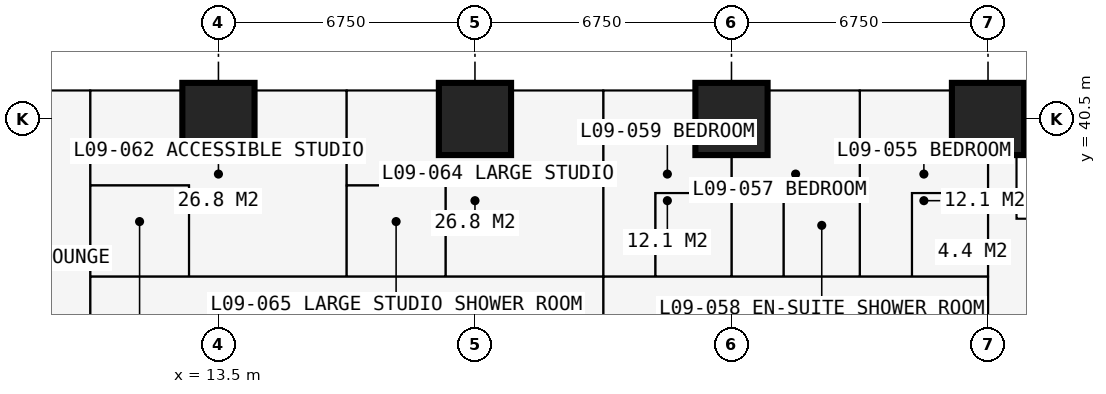
"""IFC4 building model, lengths in metres.
Left out: names, types, materials, properties, quantities, classifications, styles, units other than length and angle.
Written with IfcOpenShell. Run it as: python <this file> out.ifc"""

import sys

from ifc_helpers import new_model, si_unit, direction, frame, frame_2d, origin, origin_2d, place, context, subcontext, project, spatial, rectangle, extrude, element, fill, save


model = new_model("IFC4")
c1 = context("Model", 3, precision=1e-05, world=origin(), true_north=direction((0.0, 1.0)))
c2 = subcontext(c1, "Body", "Model", "MODEL_VIEW")
j1 = project(units=[si_unit("LENGTHUNIT", "METRE"), si_unit("PLANEANGLEUNIT", "RADIAN")], contexts=[c1])
p1 = place(None, origin())
s1 = spatial("IfcSite", under=j1, at=p1, CompositionType="ELEMENT")
p2 = place(p1, origin())
s2 = spatial("IfcBuilding", under=s1, at=p2, CompositionType="ELEMENT")
p3 = place(p2, frame((0.0, 0.0, 36.0)))
s3 = spatial("IfcBuildingStorey", under=s2, at=p3, CompositionType="ELEMENT", Elevation=36.0)
for number, where, z_axis, x_axis in (
    (1, (13.5, 40.5, 0.0), (0.0, 0.0, 1.0), (1.0, 0.0, 0.0)),
    (2, (20.25, 40.5, 0.0), (0.0, 0.0, 1.0), (1.0, 0.0, 0.0)),
    (3, (27.0, 40.5, 0.0), (0.0, 0.0, 1.0), (1.0, 0.0, 0.0)),
    (4, (33.75, 40.5, 0.0), (0.0, 0.0, 1.0), (1.0, 0.0, 0.0)),
):
    element("IfcColumn", number, at=place(p3, frame(where, z_axis=z_axis, x_axis=x_axis)), inside=s3, PredefinedType="COLUMN", context=c2, shape_type="SweptSolid", body=[
        extrude(rectangle(XDim=1.9, YDim=1.9, at=origin_2d()), origin(), (0.0, 0.0, 1.0), 3.6),
    ])
p4 = place(p3, frame((37.875, 37.875, 0.0), z_axis=(0.0, 0.0, 1.0), x_axis=(-1.0, 0.0, 0.0)))
e5 = element("IfcWall", 5, at=p4, inside=s3, PredefinedType="SOLIDWALL", context=c2, shape_type="SweptSolid", body=[
    extrude(rectangle(XDim=3.375, YDim=0.3, at=frame_2d((1.688, 0.0))), origin(), (0.0, 0.0, 1.0), 3.375),
])
p5 = place(p4, frame((0.788, 0.0, 0.6)))
e6 = element("IfcOpeningElement", 6, at=p5, cuts=e5, PredefinedType="OPENING", context=c2, shape_type="SweptSolid", body=[
    extrude(rectangle(XDim=1.8, YDim=2.1, at=frame_2d((0.9, 1.05))), frame((0.0, 0.16, 0.0), z_axis=(0.0, -1.0, 0.0), x_axis=(1.0, 0.0, 0.0)), (0.0, 0.0, 1.0), 0.32),
])
p6 = place(p3, frame((34.5, 37.875, 0.0), z_axis=(0.0, 0.0, 1.0), x_axis=(0.0, 1.0, 0.0)))
e7 = element("IfcWall", 7, at=p6, inside=s3, PredefinedType="SOLIDWALL", context=c2, shape_type="SweptSolid", body=[
    extrude(rectangle(XDim=3.375, YDim=0.3, at=frame_2d((1.688, 0.0))), origin(), (0.0, 0.0, 1.0), 3.375),
])
p7 = place(p6, frame((0.317, 0.0, 0.9)))
e8 = element("IfcOpeningElement", 8, at=p7, cuts=e7, PredefinedType="OPENING", context=c2, shape_type="SweptSolid", body=[
    extrude(rectangle(XDim=1.2, YDim=1.8, at=frame_2d((0.6, 0.9))), frame((0.0, 0.16, 0.0), z_axis=(0.0, -1.0, 0.0), x_axis=(1.0, 0.0, 0.0)), (0.0, 0.0, 1.0), 0.32),
])
p8 = place(p3, frame((20.25, 41.25, 0.0), z_axis=(0.0, 0.0, 1.0), x_axis=(1.0, 0.0, 0.0)))
e9 = element("IfcWall", 9, at=p8, inside=s3, PredefinedType="SOLIDWALL", context=c2, shape_type="SweptSolid", body=[
    extrude(rectangle(XDim=6.75, YDim=0.15, at=frame_2d((3.375, 0.0))), origin(), (0.0, 0.0, 1.0), 3.375),
])
p9 = place(p8, frame((0.996, 0.0, 0.0)))
e10 = element("IfcOpeningElement", 10, at=p9, cuts=e9, PredefinedType="OPENING", context=c2, shape_type="SweptSolid", body=[
    extrude(rectangle(XDim=1.0, YDim=2.2, at=frame_2d((0.5, 1.1))), frame((0.0, 0.085, 0.0), z_axis=(0.0, -1.0, 0.0), x_axis=(1.0, 0.0, 0.0)), (0.0, 0.0, 1.0), 0.17),
])
p10 = place(p8, frame((2.042, 0.0, 0.9)))
e11 = element("IfcOpeningElement", 11, at=p10, cuts=e9, PredefinedType="OPENING", context=c2, shape_type="SweptSolid", body=[
    extrude(rectangle(XDim=1.2, YDim=1.8, at=frame_2d((0.6, 0.9))), frame((0.0, 0.085, 0.0), z_axis=(0.0, -1.0, 0.0), x_axis=(1.0, 0.0, 0.0)), (0.0, 0.0, 1.0), 0.17),
])
p11 = place(p8, frame((4.754, 0.0, 0.0)))
e12 = element("IfcOpeningElement", 12, at=p11, cuts=e9, PredefinedType="OPENING", context=c2, shape_type="SweptSolid", body=[
    extrude(rectangle(XDim=1.0, YDim=2.2, at=frame_2d((0.5, 1.1))), frame((0.0, 0.085, 0.0), z_axis=(0.0, -1.0, 0.0), x_axis=(1.0, 0.0, 0.0)), (0.0, 0.0, 1.0), 0.17),
])
p12 = place(p8, frame((3.508, 0.0, 0.9)))
e13 = element("IfcOpeningElement", 13, at=p12, cuts=e9, PredefinedType="OPENING", context=c2, shape_type="SweptSolid", body=[
    extrude(rectangle(XDim=1.2, YDim=1.8, at=frame_2d((0.6, 0.9))), frame((0.0, 0.085, 0.0), z_axis=(0.0, -1.0, 0.0), x_axis=(1.0, 0.0, 0.0)), (0.0, 0.0, 1.0), 0.17),
])
p13 = place(p3, frame((23.625, 41.35, 0.0), z_axis=(0.0, 0.0, 1.0), x_axis=(0.0, 1.0, 0.0)))
e14 = element("IfcWall", 14, at=p13, inside=s3, PredefinedType="USERDEFINED", context=c2, shape_type="SweptSolid", body=[
    extrude(rectangle(XDim=2.2, YDim=1.0, at=frame_2d((1.1, 0.0))), origin(), (0.0, 0.0, 1.0), 0.9),
])
p14 = place(p3, frame((10.125, 30.375, 0.0), z_axis=(0.0, 0.0, 1.0), x_axis=(0.0, 1.0, 0.0)))
e15 = element("IfcWall", 15, at=p14, inside=s3, PredefinedType="PARTITIONING", context=c2, shape_type="SweptSolid", body=[
    extrude(rectangle(XDim=10.859, YDim=0.15, at=frame_2d((5.429, 0.0))), origin(), (0.0, 0.0, 1.0), 3.375),
])
p15 = place(p14, frame((4.725, 0.0, 0.0)))
e16 = element("IfcOpeningElement", 16, at=p15, cuts=e15, PredefinedType="OPENING", context=c2, shape_type="SweptSolid", body=[
    extrude(rectangle(XDim=1.0, YDim=2.2, at=frame_2d((0.5, 1.1))), frame((0.0, 0.085, 0.0), z_axis=(0.0, -1.0, 0.0), x_axis=(1.0, 0.0, 0.0)), (0.0, 0.0, 1.0), 0.17),
])
p16 = place(p3, frame((10.125, 36.35, 0.0), z_axis=(0.0, 0.0, 1.0), x_axis=(1.0, 0.0, 0.0)))
e17 = element("IfcWall", 17, at=p16, inside=s3, PredefinedType="PARTITIONING", context=c2, shape_type="SweptSolid", body=[
    extrude(rectangle(XDim=23.625, YDim=0.15, at=frame_2d((11.812, 0.0))), origin(), (0.0, 0.0, 1.0), 3.375),
])
p17 = place(p16, frame((20.5, 0.0, 0.0)))
e18 = element("IfcOpeningElement", 18, at=p17, cuts=e17, PredefinedType="OPENING", context=c2, shape_type="SweptSolid", body=[
    extrude(rectangle(XDim=0.95, YDim=2.2, at=frame_2d((0.475, 1.1))), frame((0.0, 0.085, 0.0), z_axis=(0.0, -1.0, 0.0), x_axis=(1.0, 0.0, 0.0)), (0.0, 0.0, 1.0), 0.17),
])
p18 = place(p16, frame((17.125, 0.0, 0.0)))
e19 = element("IfcOpeningElement", 19, at=p18, cuts=e17, PredefinedType="OPENING", context=c2, shape_type="SweptSolid", body=[
    extrude(rectangle(XDim=0.95, YDim=2.2, at=frame_2d((0.475, 1.1))), frame((0.0, 0.085, 0.0), z_axis=(0.0, -1.0, 0.0), x_axis=(1.0, 0.0, 0.0)), (0.0, 0.0, 1.0), 0.17),
])
p19 = place(p16, frame((13.7, 0.0, 0.0)))
e20 = element("IfcOpeningElement", 20, at=p19, cuts=e17, PredefinedType="OPENING", context=c2, shape_type="SweptSolid", body=[
    extrude(rectangle(XDim=0.95, YDim=2.2, at=frame_2d((0.475, 1.1))), frame((0.0, 0.085, 0.0), z_axis=(0.0, -1.0, 0.0), x_axis=(1.0, 0.0, 0.0)), (0.0, 0.0, 1.0), 0.17),
])
p20 = place(p16, frame((4.2, 0.0, 0.0)))
e21 = element("IfcOpeningElement", 21, at=p20, cuts=e17, PredefinedType="OPENING", context=c2, shape_type="SweptSolid", body=[
    extrude(rectangle(XDim=0.95, YDim=2.2, at=frame_2d((0.475, 1.1))), frame((0.0, 0.085, 0.0), z_axis=(0.0, -1.0, 0.0), x_axis=(1.0, 0.0, 0.0)), (0.0, 0.0, 1.0), 0.17),
])
p21 = place(p16, frame((10.95, 0.0, 0.0)))
e22 = element("IfcOpeningElement", 22, at=p21, cuts=e17, PredefinedType="OPENING", context=c2, shape_type="SweptSolid", body=[
    extrude(rectangle(XDim=0.95, YDim=2.2, at=frame_2d((0.475, 1.1))), frame((0.0, 0.085, 0.0), z_axis=(0.0, -1.0, 0.0), x_axis=(1.0, 0.0, 0.0)), (0.0, 0.0, 1.0), 0.17),
])
p22 = place(p3, frame((10.125, 38.75, 0.0), z_axis=(0.0, 0.0, 1.0), x_axis=(1.0, 0.0, 0.0)))
e23 = element("IfcWall", 23, at=p22, inside=s3, PredefinedType="PARTITIONING", context=c2, shape_type="SweptSolid", body=[
    extrude(rectangle(XDim=2.6, YDim=0.1, at=frame_2d((1.3, 0.0))), origin(), (0.0, 0.0, 1.0), 3.375),
])
p23 = place(p22, frame((0.85, 0.0, 0.0)))
e24 = element("IfcOpeningElement", 24, at=p23, cuts=e23, PredefinedType="OPENING", context=c2, shape_type="SweptSolid", body=[
    extrude(rectangle(XDim=0.9, YDim=2.2, at=frame_2d((0.45, 1.1))), frame((0.0, 0.06, 0.0), z_axis=(0.0, -1.0, 0.0), x_axis=(1.0, 0.0, 0.0)), (0.0, 0.0, 1.0), 0.12),
])
p24 = place(p3, frame((12.725, 36.35, 0.0), z_axis=(0.0, 0.0, 1.0), x_axis=(0.0, 1.0, 0.0)))
e25 = element("IfcWall", 25, at=p24, inside=s3, PredefinedType="PARTITIONING", context=c2, shape_type="SweptSolid", body=[
    extrude(rectangle(XDim=2.4, YDim=0.1, at=frame_2d((1.2, 0.0))), origin(), (0.0, 0.0, 1.0), 3.375),
])
p25 = place(p3, frame((16.875, 36.35, 0.0), z_axis=(0.0, 0.0, 1.0), x_axis=(0.0, 1.0, 0.0)))
e26 = element("IfcWall", 26, at=p25, inside=s3, PredefinedType="PARTITIONING", context=c2, shape_type="SweptSolid", body=[
    extrude(rectangle(XDim=4.884, YDim=0.175, at=frame_2d((2.442, 0.0))), origin(), (0.0, 0.0, 1.0), 3.375),
])
p26 = place(p25, frame((0.75, 0.0, 0.0)))
e27 = element("IfcOpeningElement", 27, at=p26, cuts=e26, PredefinedType="OPENING", context=c2, shape_type="SweptSolid", body=[
    extrude(rectangle(XDim=0.9, YDim=2.2, at=frame_2d((0.45, 1.1))), frame((0.0, 0.097, 0.0), z_axis=(0.0, -1.0, 0.0), x_axis=(1.0, 0.0, 0.0)), (0.0, 0.0, 1.0), 0.195),
])
p27 = place(p3, frame((16.875, 38.75, 0.0), z_axis=(0.0, 0.0, 1.0), x_axis=(1.0, 0.0, 0.0)))
e28 = element("IfcWall", 28, at=p27, inside=s3, PredefinedType="PARTITIONING", context=c2, shape_type="SweptSolid", body=[
    extrude(rectangle(XDim=2.6, YDim=0.1, at=frame_2d((1.3, 0.0))), origin(), (0.0, 0.0, 1.0), 3.375),
])
p28 = place(p3, frame((19.475, 36.35, 0.0), z_axis=(0.0, 0.0, 1.0), x_axis=(0.0, 1.0, 0.0)))
e29 = element("IfcWall", 29, at=p28, inside=s3, PredefinedType="PARTITIONING", context=c2, shape_type="SweptSolid", body=[
    extrude(rectangle(XDim=2.4, YDim=0.1, at=frame_2d((1.2, 0.0))), origin(), (0.0, 0.0, 1.0), 3.375),
])
p29 = place(p3, frame((23.625, 29.2, 0.0), z_axis=(0.0, 0.0, 1.0), x_axis=(0.0, 1.0, 0.0)))
e30 = element("IfcWall", 30, at=p29, inside=s3, PredefinedType="PARTITIONING", context=c2, shape_type="SweptSolid", body=[
    extrude(rectangle(XDim=12.034, YDim=0.15, at=frame_2d((6.017, 0.0))), origin(), (0.0, 0.0, 1.0), 3.375),
])
p30 = place(p3, frame((25.0, 36.35, 0.0), z_axis=(0.0, 0.0, 1.0), x_axis=(0.0, 1.0, 0.0)))
e31 = element("IfcWall", 31, at=p30, inside=s3, PredefinedType="PARTITIONING", context=c2, shape_type="SweptSolid", body=[
    extrude(rectangle(XDim=2.2, YDim=0.1, at=frame_2d((1.1, 0.0))), origin(), (0.0, 0.0, 1.0), 3.375),
])
p31 = place(p3, frame((25.0, 38.55, 0.0), z_axis=(0.0, 0.0, 1.0), x_axis=(1.0, 0.0, 0.0)))
e32 = element("IfcWall", 32, at=p31, inside=s3, PredefinedType="PARTITIONING", context=c2, shape_type="SweptSolid", body=[
    extrude(rectangle(XDim=2.0, YDim=0.1, at=frame_2d((1.0, 0.0))), origin(), (0.0, 0.0, 1.0), 3.375),
])
p32 = place(p3, frame((27.0, 36.35, 0.0), z_axis=(0.0, 0.0, 1.0), x_axis=(0.0, 1.0, 0.0)))
e33 = element("IfcWall", 33, at=p32, inside=s3, PredefinedType="PARTITIONING", context=c2, shape_type="SweptSolid", body=[
    extrude(rectangle(XDim=4.884, YDim=0.175, at=frame_2d((2.442, 0.0))), origin(), (0.0, 0.0, 1.0), 2.877),
])
p33 = place(p32, frame((0.65, 0.0, 0.0)))
e34 = element("IfcOpeningElement", 34, at=p33, cuts=e33, PredefinedType="OPENING", context=c2, shape_type="SweptSolid", body=[
    extrude(rectangle(XDim=0.9, YDim=2.2, at=frame_2d((0.45, 1.1))), frame((0.0, 0.097, 0.0), z_axis=(0.0, -1.0, 0.0), x_axis=(1.0, 0.0, 0.0)), (0.0, 0.0, 1.0), 0.195),
])
p34 = place(p3, frame((28.375, 36.35, 0.0), z_axis=(0.0, 0.0, 1.0), x_axis=(0.0, 1.0, 0.0)))
e35 = element("IfcWall", 35, at=p34, inside=s3, PredefinedType="PARTITIONING", context=c2, shape_type="SweptSolid", body=[
    extrude(rectangle(XDim=2.2, YDim=0.1, at=frame_2d((1.1, 0.0))), origin(), (0.0, 0.0, 1.0), 3.375),
])
p35 = place(p3, frame((28.375, 38.55, 0.0), z_axis=(0.0, 0.0, 1.0), x_axis=(1.0, 0.0, 0.0)))
e36 = element("IfcWall", 36, at=p35, inside=s3, PredefinedType="PARTITIONING", context=c2, shape_type="SweptSolid", body=[
    extrude(rectangle(XDim=2.0, YDim=0.1, at=frame_2d((1.0, 0.0))), origin(), (0.0, 0.0, 1.0), 3.375),
])
p36 = place(p3, frame((30.375, 36.35, 0.0), z_axis=(0.0, 0.0, 1.0), x_axis=(0.0, 1.0, 0.0)))
e37 = element("IfcWall", 37, at=p36, inside=s3, PredefinedType="PARTITIONING", context=c2, shape_type="SweptSolid", body=[
    extrude(rectangle(XDim=4.884, YDim=0.175, at=frame_2d((2.442, 0.0))), origin(), (0.0, 0.0, 1.0), 3.375),
])
p37 = place(p36, frame((0.65, 0.0, 0.0)))
e38 = element("IfcOpeningElement", 38, at=p37, cuts=e37, PredefinedType="OPENING", context=c2, shape_type="SweptSolid", body=[
    extrude(rectangle(XDim=0.9, YDim=2.2, at=frame_2d((0.45, 1.1))), frame((0.0, 0.097, 0.0), z_axis=(0.0, -1.0, 0.0), x_axis=(1.0, 0.0, 0.0)), (0.0, 0.0, 1.0), 0.195),
])
p38 = place(p3, frame((31.75, 36.35, 0.0), z_axis=(0.0, 0.0, 1.0), x_axis=(0.0, 1.0, 0.0)))
e39 = element("IfcWall", 39, at=p38, inside=s3, PredefinedType="PARTITIONING", context=c2, shape_type="SweptSolid", body=[
    extrude(rectangle(XDim=2.2, YDim=0.1, at=frame_2d((1.1, 0.0))), origin(), (0.0, 0.0, 1.0), 3.375),
])
p39 = place(p38, frame((0.65, 0.0, 0.0)))
e40 = element("IfcOpeningElement", 40, at=p39, cuts=e39, PredefinedType="OPENING", context=c2, shape_type="SweptSolid", body=[
    extrude(rectangle(XDim=0.9, YDim=2.2, at=frame_2d((0.45, 1.1))), frame((0.0, 0.06, 0.0), z_axis=(0.0, -1.0, 0.0), x_axis=(1.0, 0.0, 0.0)), (0.0, 0.0, 1.0), 0.12),
])
p40 = place(p3, frame((31.75, 38.55, 0.0), z_axis=(0.0, 0.0, 1.0), x_axis=(1.0, 0.0, 0.0)))
e41 = element("IfcWall", 41, at=p40, inside=s3, PredefinedType="PARTITIONING", context=c2, shape_type="SweptSolid", body=[
    extrude(rectangle(XDim=2.0, YDim=0.1, at=frame_2d((1.0, 0.0))), origin(), (0.0, 0.0, 1.0), 3.375),
])
p41 = place(p3, frame((33.75, 30.375, 0.0), z_axis=(0.0, 0.0, 1.0), x_axis=(0.0, 1.0, 0.0)))
e42 = element("IfcWall", 42, at=p41, inside=s3, PredefinedType="PARTITIONING", context=c2, shape_type="SweptSolid", body=[
    extrude(rectangle(XDim=10.859, YDim=0.15, at=frame_2d((5.429, 0.0))), origin(), (0.0, 0.0, 1.0), 2.877),
])
p42 = place(p41, frame((1.4, 0.0, 0.0)))
e43 = element("IfcOpeningElement", 43, at=p42, cuts=e42, PredefinedType="OPENING", context=c2, shape_type="SweptSolid", body=[
    extrude(rectangle(XDim=1.0, YDim=2.2, at=frame_2d((0.5, 1.1))), frame((0.0, 0.085, 0.0), z_axis=(0.0, -1.0, 0.0), x_axis=(1.0, 0.0, 0.0)), (0.0, 0.0, 1.0), 0.17),
])
p43 = place(p7, origin())
e44 = element("IfcWindow", 44, at=p43, inside=s3, PartitioningType="SINGLE_PANEL", PredefinedType="WINDOW", context=c2, shape_type="SweptSolid", body=[
    extrude(rectangle(XDim=1.2, YDim=1.8, at=frame_2d((0.6, 0.9))), frame((0.0, 0.03, 0.0), z_axis=(0.0, -1.0, 0.0), x_axis=(1.0, 0.0, 0.0)), (0.0, 0.0, 1.0), 0.06),
])
fill(e8, e44)
p44 = place(p9, origin())
e45 = element("IfcDoor", 45, at=p44, inside=s3, OperationType="SINGLE_SWING_LEFT", PredefinedType="DOOR", context=c2, shape_type="SweptSolid", body=[
    extrude(rectangle(XDim=1.0, YDim=2.2, at=frame_2d((0.5, 1.1))), frame((0.0, 0.025, 0.0), z_axis=(0.0, -1.0, 0.0), x_axis=(1.0, 0.0, 0.0)), (0.0, 0.0, 1.0), 0.05),
])
fill(e10, e45)
p45 = place(p10, origin())
e46 = element("IfcWindow", 46, at=p45, inside=s3, PartitioningType="SINGLE_PANEL", PredefinedType="WINDOW", context=c2, shape_type="SweptSolid", body=[
    extrude(rectangle(XDim=1.2, YDim=1.8, at=frame_2d((0.6, 0.9))), frame((0.0, 0.03, 0.0), z_axis=(0.0, -1.0, 0.0), x_axis=(1.0, 0.0, 0.0)), (0.0, 0.0, 1.0), 0.06),
])
fill(e11, e46)
p46 = place(p11, origin())
e47 = element("IfcDoor", 47, at=p46, inside=s3, OperationType="SINGLE_SWING_RIGHT", PredefinedType="DOOR", context=c2, shape_type="SweptSolid", body=[
    extrude(rectangle(XDim=1.0, YDim=2.2, at=frame_2d((0.5, 1.1))), frame((0.0, 0.025, 0.0), z_axis=(0.0, -1.0, 0.0), x_axis=(1.0, 0.0, 0.0)), (0.0, 0.0, 1.0), 0.05),
])
fill(e12, e47)
p47 = place(p12, origin())
e48 = element("IfcWindow", 48, at=p47, inside=s3, PartitioningType="SINGLE_PANEL", PredefinedType="WINDOW", context=c2, shape_type="SweptSolid", body=[
    extrude(rectangle(XDim=1.2, YDim=1.8, at=frame_2d((0.6, 0.9))), frame((0.0, 0.03, 0.0), z_axis=(0.0, -1.0, 0.0), x_axis=(1.0, 0.0, 0.0)), (0.0, 0.0, 1.0), 0.06),
])
fill(e13, e48)
p48 = place(p17, origin())
e49 = element("IfcDoor", 49, at=p48, inside=s3, OperationType="SINGLE_SWING_LEFT", PredefinedType="DOOR", context=c2, shape_type="SweptSolid", body=[
    extrude(rectangle(XDim=0.95, YDim=2.2, at=frame_2d((0.475, 1.1))), frame((0.0, 0.025, 0.0), z_axis=(0.0, -1.0, 0.0), x_axis=(1.0, 0.0, 0.0)), (0.0, 0.0, 1.0), 0.05),
])
fill(e18, e49)
p49 = place(p39, origin())
e50 = element("IfcDoor", 50, at=p49, inside=s3, OperationType="SINGLE_SWING_RIGHT", PredefinedType="DOOR", context=c2, shape_type="SweptSolid", body=[
    extrude(rectangle(XDim=0.9, YDim=2.2, at=frame_2d((0.45, 1.1))), frame((0.0, 0.025, 0.0), z_axis=(0.0, -1.0, 0.0), x_axis=(1.0, 0.0, 0.0)), (0.0, 0.0, 1.0), 0.05),
])
fill(e40, e50)
p50 = place(p18, origin())
e51 = element("IfcDoor", 51, at=p50, inside=s3, OperationType="SINGLE_SWING_LEFT", PredefinedType="DOOR", context=c2, shape_type="SweptSolid", body=[
    extrude(rectangle(XDim=0.95, YDim=2.2, at=frame_2d((0.475, 1.1))), frame((0.0, 0.025, 0.0), z_axis=(0.0, -1.0, 0.0), x_axis=(1.0, 0.0, 0.0)), (0.0, 0.0, 1.0), 0.05),
])
fill(e19, e51)
p51 = place(p37, origin())
e52 = element("IfcDoor", 52, at=p51, inside=s3, OperationType="SINGLE_SWING_RIGHT", PredefinedType="DOOR", context=c2, shape_type="SweptSolid", body=[
    extrude(rectangle(XDim=0.9, YDim=2.2, at=frame_2d((0.45, 1.1))), frame((0.0, 0.025, 0.0), z_axis=(0.0, -1.0, 0.0), x_axis=(1.0, 0.0, 0.0)), (0.0, 0.0, 1.0), 0.05),
])
fill(e38, e52)
p52 = place(p19, origin())
e53 = element("IfcDoor", 53, at=p52, inside=s3, OperationType="SINGLE_SWING_LEFT", PredefinedType="DOOR", context=c2, shape_type="SweptSolid", body=[
    extrude(rectangle(XDim=0.95, YDim=2.2, at=frame_2d((0.475, 1.1))), frame((0.0, 0.025, 0.0), z_axis=(0.0, -1.0, 0.0), x_axis=(1.0, 0.0, 0.0)), (0.0, 0.0, 1.0), 0.05),
])
fill(e20, e53)
p53 = place(p33, origin())
e54 = element("IfcDoor", 54, at=p53, inside=s3, OperationType="SINGLE_SWING_RIGHT", PredefinedType="DOOR", context=c2, shape_type="SweptSolid", body=[
    extrude(rectangle(XDim=0.9, YDim=2.2, at=frame_2d((0.45, 1.1))), frame((0.0, 0.025, 0.0), z_axis=(0.0, -1.0, 0.0), x_axis=(1.0, 0.0, 0.0)), (0.0, 0.0, 1.0), 0.05),
])
fill(e34, e54)
p54 = place(p20, origin())
e55 = element("IfcDoor", 55, at=p54, inside=s3, OperationType="SINGLE_SWING_LEFT", PredefinedType="DOOR", context=c2, shape_type="SweptSolid", body=[
    extrude(rectangle(XDim=0.95, YDim=2.2, at=frame_2d((0.475, 1.1))), frame((0.0, 0.025, 0.0), z_axis=(0.0, -1.0, 0.0), x_axis=(1.0, 0.0, 0.0)), (0.0, 0.0, 1.0), 0.05),
])
fill(e21, e55)
p55 = place(p23, origin())
e56 = element("IfcDoor", 56, at=p55, inside=s3, OperationType="SINGLE_SWING_RIGHT", PredefinedType="DOOR", context=c2, shape_type="SweptSolid", body=[
    extrude(rectangle(XDim=0.9, YDim=2.2, at=frame_2d((0.45, 1.1))), frame((0.0, 0.025, 0.0), z_axis=(0.0, -1.0, 0.0), x_axis=(1.0, 0.0, 0.0)), (0.0, 0.0, 1.0), 0.05),
])
fill(e24, e56)
p56 = place(p21, origin())
e57 = element("IfcDoor", 57, at=p56, inside=s3, OperationType="SINGLE_SWING_LEFT", PredefinedType="DOOR", context=c2, shape_type="SweptSolid", body=[
    extrude(rectangle(XDim=0.95, YDim=2.2, at=frame_2d((0.475, 1.1))), frame((0.0, 0.025, 0.0), z_axis=(0.0, -1.0, 0.0), x_axis=(1.0, 0.0, 0.0)), (0.0, 0.0, 1.0), 0.05),
])
fill(e22, e57)
p57 = place(p26, origin())
e58 = element("IfcDoor", 58, at=p57, inside=s3, OperationType="SINGLE_SWING_RIGHT", PredefinedType="DOOR", context=c2, shape_type="SweptSolid", body=[
    extrude(rectangle(XDim=0.9, YDim=2.2, at=frame_2d((0.45, 1.1))), frame((0.0, 0.025, 0.0), z_axis=(0.0, -1.0, 0.0), x_axis=(1.0, 0.0, 0.0)), (0.0, 0.0, 1.0), 0.05),
])
fill(e27, e58)
p58 = place(p15, origin())
e59 = element("IfcDoor", 59, at=p58, inside=s3, OperationType="SINGLE_SWING_LEFT", PredefinedType="DOOR", context=c2, shape_type="SweptSolid", body=[
    extrude(rectangle(XDim=1.0, YDim=2.2, at=frame_2d((0.5, 1.1))), frame((0.0, 0.025, 0.0), z_axis=(0.0, -1.0, 0.0), x_axis=(1.0, 0.0, 0.0)), (0.0, 0.0, 1.0), 0.05),
])
fill(e16, e59)
save(model, sys.argv[1])
